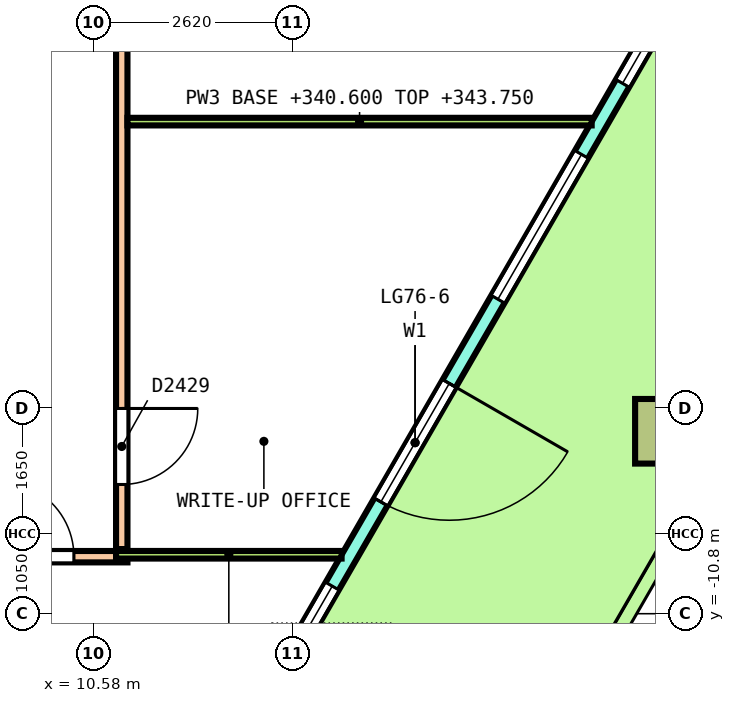
"""IFC4 building model, lengths in metres.
Left out: names, types, materials, properties, quantities, classifications, styles, units other than length and angle.
Written with IfcOpenShell. Run it as: python <this file> out.ifc"""

import sys

from ifc_helpers import new_model, si_unit, direction, frame, frame_2d, origin, origin_2d, place, context, subcontext, project, spatial, polyline, rectangle, outline, extrude, element, fill, save


model = new_model("IFC4")
c1 = context("Model", 3, precision=1e-05, world=origin(), true_north=direction((0.0, 1.0)))
c2 = subcontext(c1, "Body", "Model", "MODEL_VIEW")
j1 = project(units=[si_unit("LENGTHUNIT", "METRE"), si_unit("PLANEANGLEUNIT", "RADIAN")], contexts=[c1])
p1 = place(None, origin())
s1 = spatial("IfcSite", under=j1, at=p1, CompositionType="ELEMENT")
p2 = place(p1, origin())
s2 = spatial("IfcBuilding", under=s1, at=p2, CompositionType="ELEMENT")
p3 = place(p2, frame((0.0, 0.0, 340.6)))
s3 = spatial("IfcBuildingStorey", under=s2, at=p3, CompositionType="ELEMENT", Elevation=340.6)
for number, where, z_axis, x_axis in (
    (1, (16.339, -11.5, 0.0), (0.029, 0.05, 0.998), (0.499, 0.865, -0.058)),
    (2, (18.129, -8.4, 0.0), (-0.029, -0.05, 0.998), (0.5, 0.864, 0.058)),
):
    element("IfcColumn", number, at=place(p3, frame(where, z_axis=z_axis, x_axis=x_axis)), inside=s3, PredefinedType="COLUMN", context=c2, shape_type="SweptSolid", body=[
        extrude(rectangle(XDim=0.85, YDim=0.85, at=origin_2d()), origin(), (0.0, 0.0, 1.0), 3.656),
    ])
p4 = place(p3, frame((10.71, -15.65, 0.0), z_axis=(0.0, 0.0, 1.0), x_axis=(0.500001715796, 0.866024413167, 0.0)))
e3 = element("IfcWall", 3, at=p4, inside=s3, PredefinedType="SOLIDWALL", context=c2, shape_type="SweptSolid", body=[
    extrude(outline(polyline([(-0.027, -0.1), (1.001, -0.1), (2.029, -0.1), (3.058, -0.1), (4.086, -0.1), (5.114, -0.1), (6.142, -0.1), (7.17, -0.1), (8.198, -0.1), (9.226, -0.1), (10.254, -0.1), (11.283, -0.1), (12.311, -0.1), (13.339, -0.1), (14.367, -0.1), (15.395, -0.1), (16.423, -0.1), (16.37, 0.1), (15.348, 0.1), (14.327, 0.1), (13.305, 0.1), (12.284, 0.1), (11.262, 0.1), (10.241, 0.1), (9.22, 0.1), (8.198, 0.1), (7.177, 0.1), (6.155, 0.1), (5.134, 0.1), (4.113, 0.1), (3.091, 0.1), (2.07, 0.1), (1.048, 0.1), (0.027, 0.1), (-0.027, -0.1)])), origin(), (0.0, 0.0, 1.0), 3.8),
])
p5 = place(p4, frame((0.54, 0.0, 0.1)))
e4 = element("IfcOpeningElement", 4, at=p5, cuts=e3, PredefinedType="OPENING", context=c2, shape_type="SweptSolid", body=[
    extrude(rectangle(XDim=2.2, YDim=2.9, at=frame_2d((1.1, 1.45))), frame((0.0, 0.11, 0.0), z_axis=(0.0, -1.0, 0.0), x_axis=(1.0, 0.0, 0.0)), (0.0, 0.0, 1.0), 0.22),
])
p6 = place(p4, frame((3.819, 0.0, 0.1)))
e5 = element("IfcOpeningElement", 5, at=p6, cuts=e3, PredefinedType="OPENING", context=c2, shape_type="SweptSolid", body=[
    extrude(rectangle(XDim=2.2, YDim=2.9, at=frame_2d((1.1, 1.45))), frame((0.0, 0.11, 0.0), z_axis=(0.0, -1.0, 0.0), x_axis=(1.0, 0.0, 0.0)), (0.0, 0.0, 1.0), 0.22),
])
p7 = place(p4, frame((7.298, 0.0, 0.0)))
e6 = element("IfcOpeningElement", 6, at=p7, cuts=e3, PredefinedType="OPENING", context=c2, shape_type="SweptSolid", body=[
    extrude(rectangle(XDim=1.8, YDim=2.4, at=frame_2d((0.9, 1.2))), frame((0.0, 0.11, 0.0), z_axis=(0.0, -1.0, 0.0), x_axis=(1.0, 0.0, 0.0)), (0.0, 0.0, 1.0), 0.22),
])
p8 = place(p4, frame((7.298, 0.0, 2.55)))
e7 = element("IfcOpeningElement", 7, at=p8, cuts=e3, PredefinedType="OPENING", context=c2, shape_type="SweptSolid", body=[
    extrude(rectangle(XDim=1.8, YDim=0.45, at=frame_2d((0.9, 0.225))), frame((0.0, 0.11, 0.0), z_axis=(0.0, -1.0, 0.0), x_axis=(1.0, 0.0, 0.0)), (0.0, 0.0, 1.0), 0.22),
])
p9 = place(p4, frame((10.377, 0.0, 0.1)))
e8 = element("IfcOpeningElement", 8, at=p9, cuts=e3, PredefinedType="OPENING", context=c2, shape_type="SweptSolid", body=[
    extrude(rectangle(XDim=2.2, YDim=2.9, at=frame_2d((1.1, 1.45))), frame((0.0, 0.11, 0.0), z_axis=(0.0, -1.0, 0.0), x_axis=(1.0, 0.0, 0.0)), (0.0, 0.0, 1.0), 0.22),
])
p10 = place(p4, frame((13.657, 0.0, 0.1)))
e9 = element("IfcOpeningElement", 9, at=p10, cuts=e3, PredefinedType="OPENING", context=c2, shape_type="SweptSolid", body=[
    extrude(rectangle(XDim=2.2, YDim=2.9, at=frame_2d((1.1, 1.45))), frame((0.0, 0.11, 0.0), z_axis=(0.0, -1.0, 0.0), x_axis=(1.0, 0.0, 0.0)), (0.0, 0.0, 1.0), 0.22),
])
p11 = place(p3, frame((10.95, -9.95, 0.0), z_axis=(0.0, 0.0, 1.0), x_axis=(0.0, 1.0, 0.0)))
e10 = element("IfcWall", 10, at=p11, inside=s3, PredefinedType="PARTITIONING", context=c2, shape_type="SweptSolid", body=[
    extrude(rectangle(XDim=17.125, YDim=0.15, at=frame_2d((8.562, 0.0))), origin(), (0.0, 0.0, 1.0), 3.15),
])
p12 = place(p11, frame((0.85, 0.0, 0.0)))
e11 = element("IfcOpeningElement", 11, at=p12, cuts=e10, PredefinedType="OPENING", context=c2, shape_type="SweptSolid", body=[
    extrude(rectangle(XDim=1.0, YDim=2.1, at=frame_2d((0.5, 1.05))), frame((0.0, 0.085, 0.0), z_axis=(0.0, -1.0, 0.0), x_axis=(1.0, 0.0, 0.0)), (0.0, 0.0, 1.0), 0.17),
])
p13 = place(p11, frame((8.697, 0.0, 0.0)))
e12 = element("IfcOpeningElement", 12, at=p13, cuts=e10, PredefinedType="OPENING", context=c2, shape_type="SweptSolid", body=[
    extrude(rectangle(XDim=1.0, YDim=2.1, at=frame_2d((0.5, 1.05))), frame((0.0, 0.085, 0.0), z_axis=(0.0, -1.0, 0.0), x_axis=(1.0, 0.0, 0.0)), (0.0, 0.0, 1.0), 0.17),
])
p14 = place(p3, frame((-11.025, -10.05, 0.0), z_axis=(0.0, 0.0, 1.0), x_axis=(1.0, 0.0, 0.0)))
e13 = element("IfcWall", 13, at=p14, inside=s3, PredefinedType="PARTITIONING", context=c2, shape_type="SweptSolid", body=[
    extrude(rectangle(XDim=22.05, YDim=0.15, at=frame_2d((11.025, 0.0))), origin(), (0.0, 0.0, 1.0), 3.15),
])
p15 = place(p14, frame((4.337, 0.0, 0.0)))
e14 = element("IfcOpeningElement", 14, at=p15, cuts=e13, PredefinedType="OPENING", context=c2, shape_type="SweptSolid", body=[
    extrude(rectangle(XDim=1.2, YDim=2.1, at=frame_2d((0.6, 1.05))), frame((0.0, 0.085, 0.0), z_axis=(0.0, -1.0, 0.0), x_axis=(1.0, 0.0, 0.0)), (0.0, 0.0, 1.0), 0.17),
])
p16 = place(p14, frame((8.635, 0.0, 0.0)))
e15 = element("IfcOpeningElement", 15, at=p16, cuts=e13, PredefinedType="OPENING", context=c2, shape_type="SweptSolid", body=[
    extrude(rectangle(XDim=1.2, YDim=2.1, at=frame_2d((0.6, 1.05))), frame((0.0, 0.085, 0.0), z_axis=(0.0, -1.0, 0.0), x_axis=(1.0, 0.0, 0.0)), (0.0, 0.0, 1.0), 0.17),
])
p17 = place(p14, frame((13.118, 0.0, 0.0)))
e16 = element("IfcOpeningElement", 16, at=p17, cuts=e13, PredefinedType="OPENING", context=c2, shape_type="SweptSolid", body=[
    extrude(rectangle(XDim=1.0, YDim=2.1, at=frame_2d((0.5, 1.05))), frame((0.0, 0.085, 0.0), z_axis=(0.0, -1.0, 0.0), x_axis=(1.0, 0.0, 0.0)), (0.0, 0.0, 1.0), 0.17),
])
p18 = place(p14, frame((17.547, 0.0, 0.0)))
e17 = element("IfcOpeningElement", 17, at=p18, cuts=e13, PredefinedType="OPENING", context=c2, shape_type="SweptSolid", body=[
    extrude(rectangle(XDim=1.0, YDim=2.1, at=frame_2d((0.5, 1.05))), frame((0.0, 0.085, 0.0), z_axis=(0.0, -1.0, 0.0), x_axis=(1.0, 0.0, 0.0)), (0.0, 0.0, 1.0), 0.17),
])
p19 = place(p14, frame((20.346, 0.0, 0.0)))
e18 = element("IfcOpeningElement", 18, at=p19, cuts=e13, PredefinedType="OPENING", context=c2, shape_type="SweptSolid", body=[
    extrude(rectangle(XDim=1.0, YDim=2.1, at=frame_2d((0.5, 1.05))), frame((0.0, 0.085, 0.0), z_axis=(0.0, -1.0, 0.0), x_axis=(1.0, 0.0, 0.0)), (0.0, 0.0, 1.0), 0.17),
])
p20 = place(p3, frame((10.875, -10.025, 0.0), z_axis=(0.0, 0.0, 1.0), x_axis=(1.0, 0.0, 0.0)))
e19 = element("IfcWall", 19, at=p20, inside=s3, PredefinedType="PARTITIONING", context=c2, shape_type="SweptSolid", body=[
    extrude(rectangle(XDim=2.967, YDim=0.1, at=frame_2d((1.484, 0.0))), origin(), (0.0, 0.0, 1.0), 3.15),
])
p21 = place(p3, frame((11.025, -4.326, 0.0), z_axis=(0.0, 0.0, 1.0), x_axis=(1.0, 0.0, 0.0)))
e20 = element("IfcWall", 20, at=p21, inside=s3, PredefinedType="PARTITIONING", context=c2, shape_type="SweptSolid", body=[
    extrude(rectangle(XDim=6.107, YDim=0.1, at=frame_2d((3.054, 0.0))), origin(), (0.0, 0.0, 1.0), 3.15),
])
p22 = place(p6, origin())
e21 = element("IfcWindow", 21, at=p22, inside=s3, PartitioningType="SINGLE_PANEL", PredefinedType="WINDOW", context=c2, shape_type="SweptSolid", body=[
    extrude(rectangle(XDim=2.2, YDim=2.9, at=frame_2d((1.1, 1.45))), frame((0.0, 0.03, 0.0), z_axis=(0.0, -1.0, 0.0), x_axis=(1.0, 0.0, 0.0)), (0.0, 0.0, 1.0), 0.06),
])
fill(e5, e21)
p23 = place(p7, origin())
e22 = element("IfcDoor", 22, at=p23, inside=s3, OperationType="DOUBLE_DOOR_SINGLE_SWING", PredefinedType="DOOR", context=c2, shape_type="SweptSolid", body=[
    extrude(rectangle(XDim=1.8, YDim=2.4, at=frame_2d((0.9, 1.2))), frame((0.0, 0.025, 0.0), z_axis=(0.0, -1.0, 0.0), x_axis=(1.0, 0.0, 0.0)), (0.0, 0.0, 1.0), 0.05),
])
fill(e6, e22)
p24 = place(p8, origin())
e23 = element("IfcWindow", 23, at=p24, inside=s3, PartitioningType="SINGLE_PANEL", PredefinedType="WINDOW", context=c2, shape_type="SweptSolid", body=[
    extrude(rectangle(XDim=1.8, YDim=0.45, at=frame_2d((0.9, 0.225))), frame((0.0, 0.03, 0.0), z_axis=(0.0, -1.0, 0.0), x_axis=(1.0, 0.0, 0.0)), (0.0, 0.0, 1.0), 0.06),
])
fill(e7, e23)
p25 = place(p9, origin())
e24 = element("IfcWindow", 24, at=p25, inside=s3, PartitioningType="SINGLE_PANEL", PredefinedType="WINDOW", context=c2, shape_type="SweptSolid", body=[
    extrude(rectangle(XDim=2.2, YDim=2.9, at=frame_2d((1.1, 1.45))), frame((0.0, 0.03, 0.0), z_axis=(0.0, -1.0, 0.0), x_axis=(1.0, 0.0, 0.0)), (0.0, 0.0, 1.0), 0.06),
])
fill(e8, e24)
p26 = place(p10, origin())
e25 = element("IfcWindow", 25, at=p26, inside=s3, PartitioningType="SINGLE_PANEL", PredefinedType="WINDOW", context=c2, shape_type="SweptSolid", body=[
    extrude(rectangle(XDim=2.2, YDim=2.9, at=frame_2d((1.1, 1.45))), frame((0.0, 0.03, 0.0), z_axis=(0.0, -1.0, 0.0), x_axis=(1.0, 0.0, 0.0)), (0.0, 0.0, 1.0), 0.06),
])
fill(e9, e25)
p27 = place(p19, origin())
e26 = element("IfcDoor", 26, at=p27, inside=s3, OperationType="SINGLE_SWING_RIGHT", PredefinedType="DOOR", context=c2, shape_type="SweptSolid", body=[
    extrude(rectangle(XDim=1.0, YDim=2.1, at=frame_2d((0.5, 1.05))), frame((0.0, 0.025, 0.0), z_axis=(0.0, -1.0, 0.0), x_axis=(1.0, 0.0, 0.0)), (0.0, 0.0, 1.0), 0.05),
])
fill(e18, e26)
p28 = place(p12, origin())
e27 = element("IfcDoor", 27, at=p28, inside=s3, OperationType="SINGLE_SWING_RIGHT", PredefinedType="DOOR", context=c2, shape_type="SweptSolid", body=[
    extrude(rectangle(XDim=1.0, YDim=2.1, at=frame_2d((0.5, 1.05))), frame((0.0, 0.025, 0.0), z_axis=(0.0, -1.0, 0.0), x_axis=(1.0, 0.0, 0.0)), (0.0, 0.0, 1.0), 0.05),
])
fill(e11, e27)
save(model, sys.argv[1])
